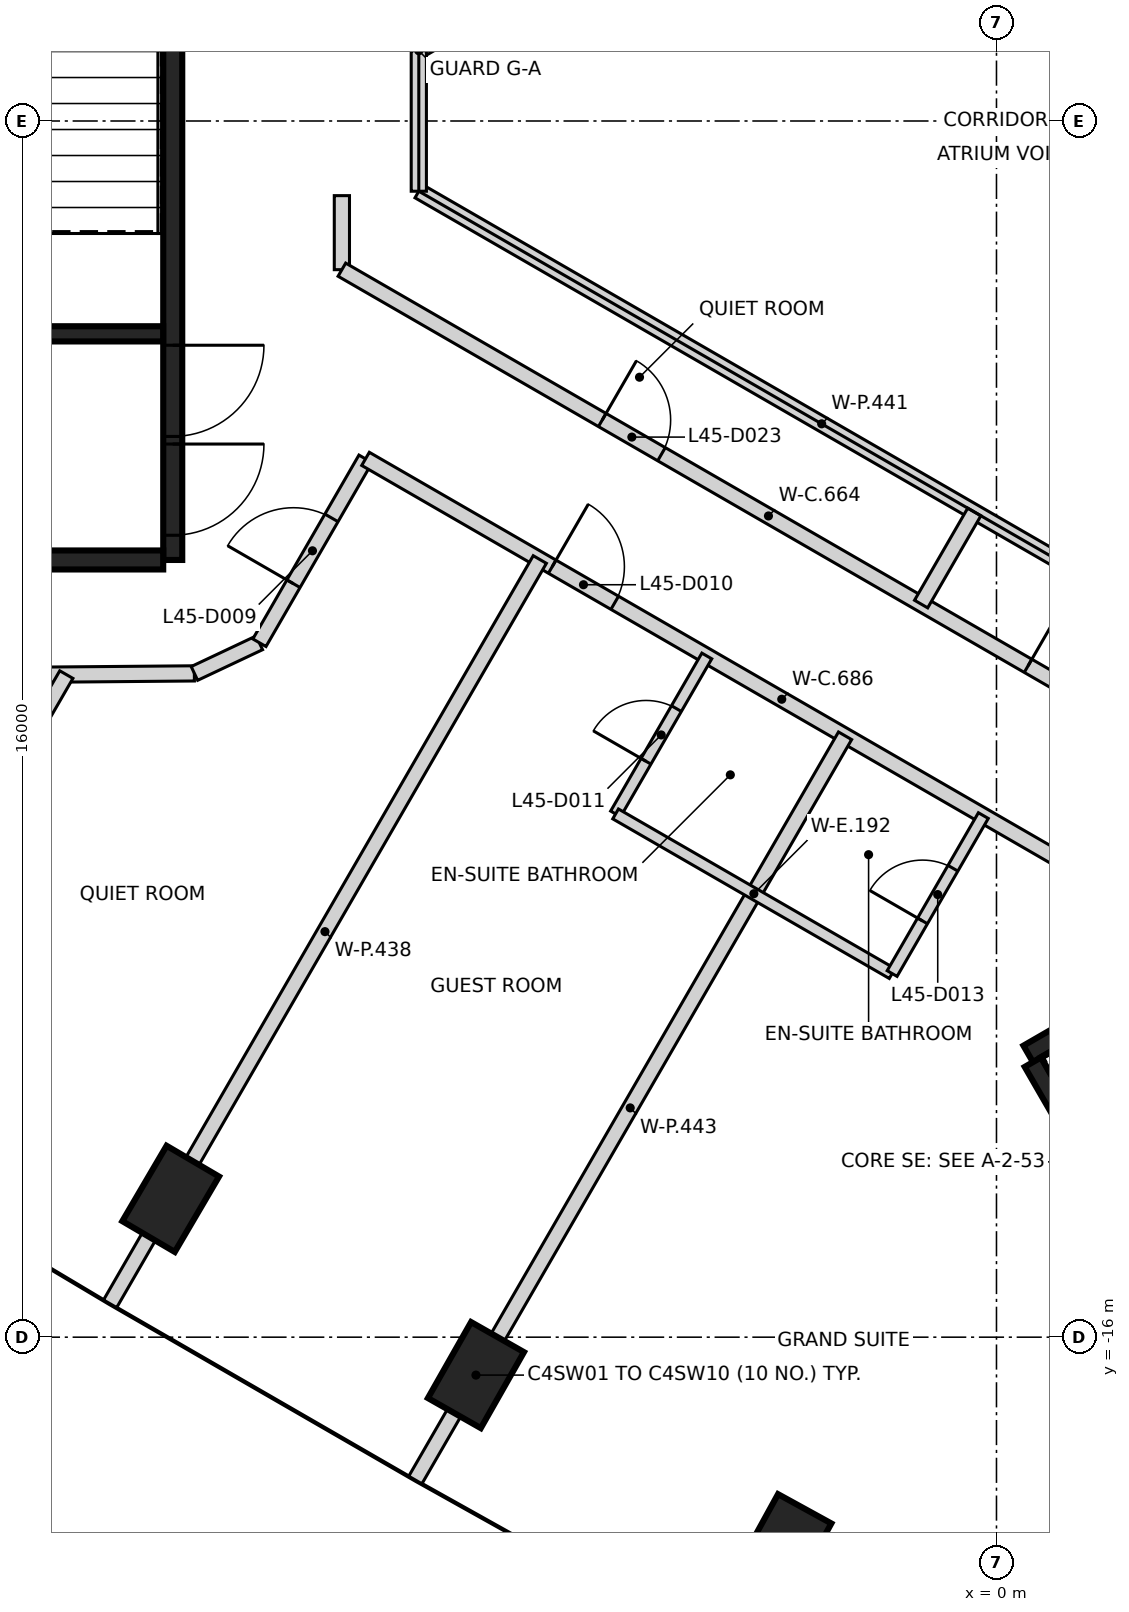
"""IFC4 building model, lengths in metres.
Left out: names, types, materials, properties, quantities, classifications, styles, units other than length and angle.
Written with IfcOpenShell. Run it as: python <this file> out.ifc"""

import sys

from ifc_helpers import new_model, si_unit, direction, frame, frame_2d, origin, origin_2d, place, context, subcontext, project, spatial, rectangle, extrude, element, fill, save


model = new_model("IFC4")
c1 = context("Model", 3, precision=1e-05, world=origin(), true_north=direction((0.0, 1.0)))
c2 = subcontext(c1, "Body", "Model", "MODEL_VIEW")
j1 = project(units=[si_unit("LENGTHUNIT", "METRE"), si_unit("PLANEANGLEUNIT", "RADIAN")], contexts=[c1])
p1 = place(None, origin())
s1 = spatial("IfcSite", under=j1, at=p1, CompositionType="ELEMENT")
p2 = place(p1, origin())
s2 = spatial("IfcBuilding", under=s1, at=p2, CompositionType="ELEMENT")
p3 = place(p2, frame((0.0, 0.0, 182.8)))
s3 = spatial("IfcBuildingStorey", under=s2, at=p3, CompositionType="ELEMENT", Elevation=182.8)
for number, where, z_axis, x_axis in (
    (1, (-10.864, -14.18, -0.35), (0.0, 0.0, 1.0), (0.506, 0.862, 0.0)),
    (2, (-6.848, -16.499, -0.35), (0.0, 0.0, 1.0), (0.494, 0.87, 0.0)),
    (3, (-2.8, -18.762, -0.35), (0.0, 0.0, 1.0), (0.482, 0.876, 0.0)),
):
    element("IfcColumn", number, at=place(p3, frame(where, z_axis=z_axis, x_axis=x_axis)), inside=s3, PredefinedType="COLUMN", context=c2, shape_type="SweptSolid", body=[
        extrude(rectangle(XDim=1.15, YDim=0.8, at=origin_2d()), origin(), (0.0, 0.0, 1.0), 3.6),
    ])
p4 = place(p3, frame((-10.837, 5.775, 0.0), z_axis=(0.0, 0.0, 1.0), x_axis=(0.0, -1.0, 0.0)))
e4 = element("IfcWall", 4, at=p4, inside=s3, PredefinedType="SHEAR", context=c2, shape_type="SweptSolid", body=[
    extrude(rectangle(XDim=11.55, YDim=0.25, at=frame_2d((5.775, 0.0))), origin(), (0.0, 0.0, 1.0), 3.25),
])
p5 = place(p4, frame((10.025, 0.0, 0.0)))
e5 = element("IfcOpeningElement", 5, at=p5, cuts=e4, PredefinedType="OPENING", context=c2, shape_type="SweptSolid", body=[
    extrude(rectangle(XDim=1.2, YDim=2.1, at=frame_2d((0.6, 1.05))), frame((0.0, 0.135, 0.0), z_axis=(0.0, -1.0, 0.0), x_axis=(1.0, 0.0, 0.0)), (0.0, 0.0, 1.0), 0.27),
])
p6 = place(p4, frame((8.725, 0.0, 0.0)))
e6 = element("IfcOpeningElement", 6, at=p6, cuts=e4, PredefinedType="OPENING", context=c2, shape_type="SweptSolid", body=[
    extrude(rectangle(XDim=1.2, YDim=2.1, at=frame_2d((0.6, 1.05))), frame((0.0, 0.135, 0.0), z_axis=(0.0, -1.0, 0.0), x_axis=(1.0, 0.0, 0.0)), (0.0, 0.0, 1.0), 0.27),
])
p7 = place(p3, frame((-10.963, -5.775, 0.0), z_axis=(0.0, 0.0, 1.0), x_axis=(-1.0, 0.0, 0.0)))
e7 = element("IfcWall", 7, at=p7, inside=s3, PredefinedType="SHEAR", context=c2, shape_type="SweptSolid", body=[
    extrude(rectangle(XDim=5.225, YDim=0.25, at=frame_2d((2.612, 0.0))), origin(), (0.0, 0.0, 1.0), 3.25),
])
p8 = place(p3, frame((-10.963, -2.8, 0.0), z_axis=(0.0, 0.0, 1.0), x_axis=(-1.0, 0.0, 0.0)))
e8 = element("IfcWall", 8, at=p8, inside=s3, PredefinedType="SHEAR", context=c2, shape_type="SweptSolid", body=[
    extrude(rectangle(XDim=5.098, YDim=0.2, at=frame_2d((2.549, 0.0))), origin(), (0.0, 0.0, 1.0), 3.25),
])
p9 = place(p8, frame((1.774, 0.0, 0.0)))
e9 = element("IfcOpeningElement", 9, at=p9, cuts=e8, PredefinedType="OPENING", context=c2, shape_type="SweptSolid", body=[
    extrude(rectangle(XDim=1.4, YDim=2.1, at=frame_2d((0.7, 1.05))), frame((0.0, 0.11, 0.0), z_axis=(0.0, -1.0, 0.0), x_axis=(1.0, 0.0, 0.0)), (0.0, 0.0, 1.0), 0.22),
])
p10 = place(p3, frame((0.417, -12.273, 0.0), z_axis=(0.0, 0.0, 1.0), x_axis=(0.866021906294, 0.500006057782, 0.0)))
e10 = element("IfcWall", 10, at=p10, inside=s3, PredefinedType="SHEAR", context=c2, shape_type="SweptSolid", body=[
    extrude(rectangle(XDim=11.55, YDim=0.25, at=frame_2d((5.775, 0.0))), origin(), (0.0, 0.0, 1.0), 3.25),
])
p11 = place(p10, frame((10.025, 0.0, 0.0)))
e11 = element("IfcOpeningElement", 11, at=p11, cuts=e10, PredefinedType="OPENING", context=c2, shape_type="SweptSolid", body=[
    extrude(rectangle(XDim=1.2, YDim=2.1, at=frame_2d((0.6, 1.05))), frame((0.0, 0.135, 0.0), z_axis=(0.0, -1.0, 0.0), x_axis=(1.0, 0.0, 0.0)), (0.0, 0.0, 1.0), 0.27),
])
p12 = place(p10, frame((8.725, 0.0, 0.0)))
e12 = element("IfcOpeningElement", 12, at=p12, cuts=e10, PredefinedType="OPENING", context=c2, shape_type="SweptSolid", body=[
    extrude(rectangle(XDim=1.2, YDim=2.1, at=frame_2d((0.6, 1.05))), frame((0.0, 0.135, 0.0), z_axis=(0.0, -1.0, 0.0), x_axis=(1.0, 0.0, 0.0)), (0.0, 0.0, 1.0), 0.27),
])
p13 = place(p3, frame((3.235, -17.153, 0.0), z_axis=(0.0, 0.0, 1.0), x_axis=(-0.500008851346, 0.866020293397, 0.0)))
e13 = element("IfcWall", 13, at=p13, inside=s3, PredefinedType="SHEAR", context=c2, shape_type="SweptSolid", body=[
    extrude(rectangle(XDim=5.51, YDim=0.25, at=frame_2d((2.755, 0.0))), origin(), (0.0, 0.0, 1.0), 3.25),
])
p14 = place(p3, frame((-20.944, -7.356, 0.0), z_axis=(0.0, 0.0, 1.0), x_axis=(0.999963632327, 0.008528424382, 0.0)))
e14 = element("IfcWall", 14, at=p14, inside=s3, PredefinedType="PARTITIONING", context=c2, shape_type="SweptSolid", body=[
    extrude(rectangle(XDim=10.392, YDim=0.2, at=frame_2d((5.196, 0.0))), origin(), (0.0, 0.0, 1.0), 3.25),
])
p15 = place(p14, frame((0.437, 0.0, 0.0)))
e15 = element("IfcOpeningElement", 15, at=p15, cuts=e14, PredefinedType="OPENING", context=c2, shape_type="SweptSolid", body=[
    extrude(rectangle(XDim=1.0, YDim=2.1, at=frame_2d((0.5, 1.05))), frame((0.0, 0.11, 0.0), z_axis=(0.0, -1.0, 0.0), x_axis=(1.0, 0.0, 0.0)), (0.0, 0.0, 1.0), 0.22),
])
p16 = place(p14, frame((5.419, 0.0, 0.0)))
e16 = element("IfcOpeningElement", 16, at=p16, cuts=e14, PredefinedType="OPENING", context=c2, shape_type="SweptSolid", body=[
    extrude(rectangle(XDim=0.95, YDim=2.1, at=frame_2d((0.475, 1.05))), frame((0.0, 0.11, 0.0), z_axis=(0.0, -1.0, 0.0), x_axis=(1.0, 0.0, 0.0)), (0.0, 0.0, 1.0), 0.22),
])
p17 = place(p3, frame((-10.552, -7.268, 0.0), z_axis=(0.0, 0.0, 1.0), x_axis=(0.904331815333, 0.426830139255, 0.0)))
e17 = element("IfcWall", 17, at=p17, inside=s3, PredefinedType="PARTITIONING", context=c2, shape_type="SweptSolid", body=[
    extrude(rectangle(XDim=0.944, YDim=0.2, at=frame_2d((0.472, 0.0))), origin(), (0.0, 0.0, 1.0), 3.25),
])
p18 = place(p3, frame((-9.697, -6.864, 0.0), z_axis=(0.0, 0.0, 1.0), x_axis=(0.499843530644, 0.866115722564, 0.0)))
e18 = element("IfcWall", 18, at=p18, inside=s3, PredefinedType="PARTITIONING", context=c2, shape_type="SweptSolid", body=[
    extrude(rectangle(XDim=2.793, YDim=0.2, at=frame_2d((1.396, 0.0))), origin(), (0.0, 0.0, 1.0), 3.25),
])
p19 = place(p18, frame((0.896, 0.0, 0.0)))
e19 = element("IfcOpeningElement", 19, at=p19, cuts=e18, PredefinedType="OPENING", context=c2, shape_type="SweptSolid", body=[
    extrude(rectangle(XDim=1.0, YDim=2.1, at=frame_2d((0.5, 1.05))), frame((0.0, 0.11, 0.0), z_axis=(0.0, -1.0, 0.0), x_axis=(1.0, 0.0, 0.0)), (0.0, 0.0, 1.0), 0.22),
])
p20 = place(p3, frame((-8.612, -1.956, 0.0), z_axis=(0.0, 0.0, 1.0), x_axis=(0.0, 1.0, 0.0)))
e20 = element("IfcWall", 20, at=p20, inside=s3, PredefinedType="PARTITIONING", context=c2, shape_type="SweptSolid", body=[
    extrude(rectangle(XDim=0.974, YDim=0.2, at=frame_2d((0.487, 0.0))), origin(), (0.0, 0.0, 1.0), 3.25),
])
p21 = place(p3, frame((-8.612, -1.956, 0.0), z_axis=(0.0, 0.0, 1.0), x_axis=(0.866034386606, -0.499984440973, 0.0)))
e21 = element("IfcWall", 21, at=p21, inside=s3, PredefinedType="PARTITIONING", context=c2, shape_type="SweptSolid", body=[
    extrude(rectangle(XDim=12.96, YDim=0.2, at=frame_2d((6.48, 0.0))), origin(), (0.0, 0.0, 1.0), 3.25),
])
p22 = place(p21, frame((3.955, 0.0, 0.0)))
e22 = element("IfcOpeningElement", 22, at=p22, cuts=e21, PredefinedType="OPENING", context=c2, shape_type="SweptSolid", body=[
    extrude(rectangle(XDim=0.9, YDim=2.1, at=frame_2d((0.45, 1.05))), frame((0.0, 0.11, 0.0), z_axis=(0.0, -1.0, 0.0), x_axis=(1.0, 0.0, 0.0)), (0.0, 0.0, 1.0), 0.22),
])
p23 = place(p21, frame((10.424, 0.0, 0.0)))
e23 = element("IfcOpeningElement", 23, at=p23, cuts=e21, PredefinedType="OPENING", context=c2, shape_type="SweptSolid", body=[
    extrude(rectangle(XDim=0.9, YDim=2.1, at=frame_2d((0.45, 1.05))), frame((0.0, 0.11, 0.0), z_axis=(0.0, -1.0, 0.0), x_axis=(1.0, 0.0, 0.0)), (0.0, 0.0, 1.0), 0.22),
])
p24 = place(p3, frame((-8.301, -4.445, 0.0), z_axis=(0.0, 0.0, 1.0), x_axis=(0.865969859016, -0.500096194023, 0.0)))
e24 = element("IfcWall", 24, at=p24, inside=s3, PredefinedType="PARTITIONING", context=c2, shape_type="SweptSolid", body=[
    extrude(rectangle(XDim=12.647, YDim=0.2, at=frame_2d((6.323, 0.0))), origin(), (0.0, 0.0, 1.0), 3.25),
])
p25 = place(p24, frame((2.836, 0.0, 0.0)))
e25 = element("IfcOpeningElement", 25, at=p25, cuts=e24, PredefinedType="OPENING", context=c2, shape_type="SweptSolid", body=[
    extrude(rectangle(XDim=0.95, YDim=2.1, at=frame_2d((0.475, 1.05))), frame((0.0, 0.11, 0.0), z_axis=(0.0, -1.0, 0.0), x_axis=(1.0, 0.0, 0.0)), (0.0, 0.0, 1.0), 0.22),
])
p26 = place(p24, frame((11.467, 0.0, 0.0)))
e26 = element("IfcOpeningElement", 26, at=p26, cuts=e24, PredefinedType="OPENING", context=c2, shape_type="SweptSolid", body=[
    extrude(rectangle(XDim=0.95, YDim=2.1, at=frame_2d((0.475, 1.05))), frame((0.0, 0.11, 0.0), z_axis=(0.0, -1.0, 0.0), x_axis=(1.0, 0.0, 0.0)), (0.0, 0.0, 1.0), 0.22),
])
p27 = place(p3, frame((-15.645, -13.187, 0.0), z_axis=(0.0, 0.0, 1.0), x_axis=(0.499921913572, 0.866070482311, 0.0)))
e27 = element("IfcWall", 27, at=p27, inside=s3, PredefinedType="PARTITIONING", context=c2, shape_type="SweptSolid", body=[
    extrude(rectangle(XDim=6.816, YDim=0.2, at=frame_2d((3.408, 0.0))), origin(), (0.0, 0.0, 1.0), 3.25),
])
p28 = place(p3, frame((-11.661, -15.561, 0.0), z_axis=(0.0, 0.0, 1.0), x_axis=(0.500012795616, 0.866018016106, 0.0)))
e28 = element("IfcWall", 28, at=p28, inside=s3, PredefinedType="PARTITIONING", context=c2, shape_type="SweptSolid", body=[
    extrude(rectangle(XDim=11.306, YDim=0.2, at=frame_2d((5.653, 0.0))), origin(), (0.0, 0.0, 1.0), 3.25),
])
for number, where, z_axis, x_axis in (
    (29, (-7.6, 0.924, 0.0), (0.0, 0.0, 1.0), (0.866, 0.5, 0.0)),
    (30, (-7.6, -0.924, 0.0), (0.0, 0.0, 1.0), (0.866, -0.5, 0.0)),
):
    element("IfcWall", number, at=place(p3, frame(where, z_axis=z_axis, x_axis=x_axis)), inside=s3, PredefinedType="PARTITIONING", context=c2, shape_type="SweptSolid", body=[
        extrude(rectangle(XDim=12.24, YDim=0.2, at=frame_2d((6.12, 0.0))), origin(), (0.0, 0.0, 1.0), 3.25),
    ])
p29 = place(p3, frame((-7.6, -0.924, 0.0), z_axis=(0.0, 0.0, 1.0), x_axis=(0.0, 1.0, 0.0)))
e31 = element("IfcWall", 31, at=p29, inside=s3, PredefinedType="PARTITIONING", context=c2, shape_type="SweptSolid", body=[
    extrude(rectangle(XDim=1.848, YDim=0.2, at=frame_2d((0.924, 0.0))), origin(), (0.0, 0.0, 1.0), 3.25),
])
p30 = place(p3, frame((-7.646, -17.879, 0.0), z_axis=(0.0, 0.0, 1.0), x_axis=(0.500031496802, 0.866007218334, 0.0)))
e32 = element("IfcWall", 32, at=p30, inside=s3, PredefinedType="PARTITIONING", context=c2, shape_type="SweptSolid", body=[
    extrude(rectangle(XDim=11.306, YDim=0.2, at=frame_2d((5.653, 0.0))), origin(), (0.0, 0.0, 1.0), 3.25),
])
p31 = place(p3, frame((-0.992, -6.355, 0.0), z_axis=(0.0, 0.0, 1.0), x_axis=(0.500059638837, 0.865990968548, 0.0)))
e33 = element("IfcWall", 33, at=p31, inside=s3, PredefinedType="PARTITIONING", context=c2, shape_type="SweptSolid", body=[
    extrude(rectangle(XDim=1.4, YDim=0.2, at=frame_2d((0.7, 0.0))), origin(), (0.0, 0.0, 1.0), 3.25),
])
p32 = place(p3, frame((-5.011, -9.116, 0.0), z_axis=(0.0, 0.0, 1.0), x_axis=(0.500089422704, 0.865973769406, 0.0)))
e34 = element("IfcWall", 34, at=p32, inside=s3, PredefinedType="PARTITIONING", context=c2, shape_type="SweptSolid", body=[
    extrude(rectangle(XDim=2.399, YDim=0.15, at=frame_2d((1.2, 0.0))), origin(), (0.0, 0.0, 1.0), 3.25),
])
p33 = place(p32, frame((0.8, 0.0, 0.0)))
e35 = element("IfcOpeningElement", 35, at=p33, cuts=e34, PredefinedType="OPENING", context=c2, shape_type="SweptSolid", body=[
    extrude(rectangle(XDim=0.8, YDim=2.1, at=frame_2d((0.4, 1.05))), frame((0.0, 0.085, 0.0), z_axis=(0.0, -1.0, 0.0), x_axis=(1.0, 0.0, 0.0)), (0.0, 0.0, 1.0), 0.17),
])
p34 = place(p3, frame((-5.011, -9.116, 0.0), z_axis=(0.0, 0.0, 1.0), x_axis=(0.866052994476, -0.499952208475, 0.0)))
e36 = element("IfcWall", 36, at=p34, inside=s3, PredefinedType="PARTITIONING", context=c2, shape_type="SweptSolid", body=[
    extrude(rectangle(XDim=4.201, YDim=0.15, at=frame_2d((2.1, 0.0))), origin(), (0.0, 0.0, 1.0), 3.25),
])
p35 = place(p3, frame((-1.373, -11.216, 0.0), z_axis=(0.0, 0.0, 1.0), x_axis=(0.500045362686, 0.865999212041, 0.0)))
e37 = element("IfcWall", 37, at=p35, inside=s3, PredefinedType="PARTITIONING", context=c2, shape_type="SweptSolid", body=[
    extrude(rectangle(XDim=2.4, YDim=0.15, at=frame_2d((1.2, 0.0))), origin(), (0.0, 0.0, 1.0), 3.25),
])
p36 = place(p35, frame((0.8, 0.0, 0.0)))
e38 = element("IfcOpeningElement", 38, at=p36, cuts=e37, PredefinedType="OPENING", context=c2, shape_type="SweptSolid", body=[
    extrude(rectangle(XDim=0.8, YDim=2.1, at=frame_2d((0.4, 1.05))), frame((0.0, 0.085, 0.0), z_axis=(0.0, -1.0, 0.0), x_axis=(1.0, 0.0, 0.0)), (0.0, 0.0, 1.0), 0.17),
])
p37 = place(p5, origin())
e39 = element("IfcDoor", 39, at=p37, inside=s3, OperationType="SINGLE_SWING_LEFT", PredefinedType="DOOR", context=c2, shape_type="SweptSolid", body=[
    extrude(rectangle(XDim=1.2, YDim=2.1, at=frame_2d((0.6, 1.05))), frame((0.0, 0.025, 0.0), z_axis=(0.0, -1.0, 0.0), x_axis=(1.0, 0.0, 0.0)), (0.0, 0.0, 1.0), 0.05),
])
fill(e5, e39)
p38 = place(p6, origin())
e40 = element("IfcDoor", 40, at=p38, inside=s3, OperationType="SINGLE_SWING_RIGHT", PredefinedType="DOOR", context=c2, shape_type="SweptSolid", body=[
    extrude(rectangle(XDim=1.2, YDim=2.1, at=frame_2d((0.6, 1.05))), frame((0.0, 0.025, 0.0), z_axis=(0.0, -1.0, 0.0), x_axis=(1.0, 0.0, 0.0)), (0.0, 0.0, 1.0), 0.05),
])
fill(e6, e40)
p39 = place(p19, frame((1.0, 0.0, 0.0), z_axis=(0.0, 0.0, 1.0), x_axis=(-1.0, 0.0, 0.0)))
e41 = element("IfcDoor", 41, at=p39, inside=s3, OperationType="SINGLE_SWING_LEFT", PredefinedType="DOOR", context=c2, shape_type="SweptSolid", body=[
    extrude(rectangle(XDim=1.0, YDim=2.1, at=frame_2d((0.5, 1.05))), frame((0.0, 0.025, 0.0), z_axis=(0.0, -1.0, 0.0), x_axis=(1.0, 0.0, 0.0)), (0.0, 0.0, 1.0), 0.05),
])
fill(e19, e41)
p40 = place(p25, frame((0.95, 0.0, 0.0), z_axis=(0.0, 0.0, 1.0), x_axis=(-1.0, 0.0, 0.0)))
e42 = element("IfcDoor", 42, at=p40, inside=s3, OperationType="SINGLE_SWING_LEFT", PredefinedType="DOOR", context=c2, shape_type="SweptSolid", body=[
    extrude(rectangle(XDim=0.95, YDim=2.1, at=frame_2d((0.475, 1.05))), frame((0.0, 0.025, 0.0), z_axis=(0.0, -1.0, 0.0), x_axis=(1.0, 0.0, 0.0)), (0.0, 0.0, 1.0), 0.05),
])
fill(e25, e42)
p41 = place(p33, origin())
e43 = element("IfcDoor", 43, at=p41, inside=s3, OperationType="SINGLE_SWING_LEFT", PredefinedType="DOOR", context=c2, shape_type="SweptSolid", body=[
    extrude(rectangle(XDim=0.8, YDim=2.1, at=frame_2d((0.4, 1.05))), frame((0.0, 0.025, 0.0), z_axis=(0.0, -1.0, 0.0), x_axis=(1.0, 0.0, 0.0)), (0.0, 0.0, 1.0), 0.05),
])
fill(e35, e43)
p42 = place(p36, frame((0.8, 0.0, 0.0), z_axis=(0.0, 0.0, 1.0), x_axis=(-1.0, 0.0, 0.0)))
e44 = element("IfcDoor", 44, at=p42, inside=s3, OperationType="SINGLE_SWING_LEFT", PredefinedType="DOOR", context=c2, shape_type="SweptSolid", body=[
    extrude(rectangle(XDim=0.8, YDim=2.1, at=frame_2d((0.4, 1.05))), frame((0.0, 0.025, 0.0), z_axis=(0.0, -1.0, 0.0), x_axis=(1.0, 0.0, 0.0)), (0.0, 0.0, 1.0), 0.05),
])
fill(e38, e44)
p43 = place(p22, origin())
e45 = element("IfcDoor", 45, at=p43, inside=s3, OperationType="SINGLE_SWING_LEFT", PredefinedType="DOOR", context=c2, shape_type="SweptSolid", body=[
    extrude(rectangle(XDim=0.9, YDim=2.1, at=frame_2d((0.45, 1.05))), frame((0.0, 0.025, 0.0), z_axis=(0.0, -1.0, 0.0), x_axis=(1.0, 0.0, 0.0)), (0.0, 0.0, 1.0), 0.05),
])
fill(e22, e45)
p44 = place(p23, origin())
e46 = element("IfcDoor", 46, at=p44, inside=s3, OperationType="SINGLE_SWING_LEFT", PredefinedType="DOOR", context=c2, shape_type="SweptSolid", body=[
    extrude(rectangle(XDim=0.9, YDim=2.1, at=frame_2d((0.45, 1.05))), frame((0.0, 0.025, 0.0), z_axis=(0.0, -1.0, 0.0), x_axis=(1.0, 0.0, 0.0)), (0.0, 0.0, 1.0), 0.05),
])
fill(e23, e46)
save(model, sys.argv[1])
